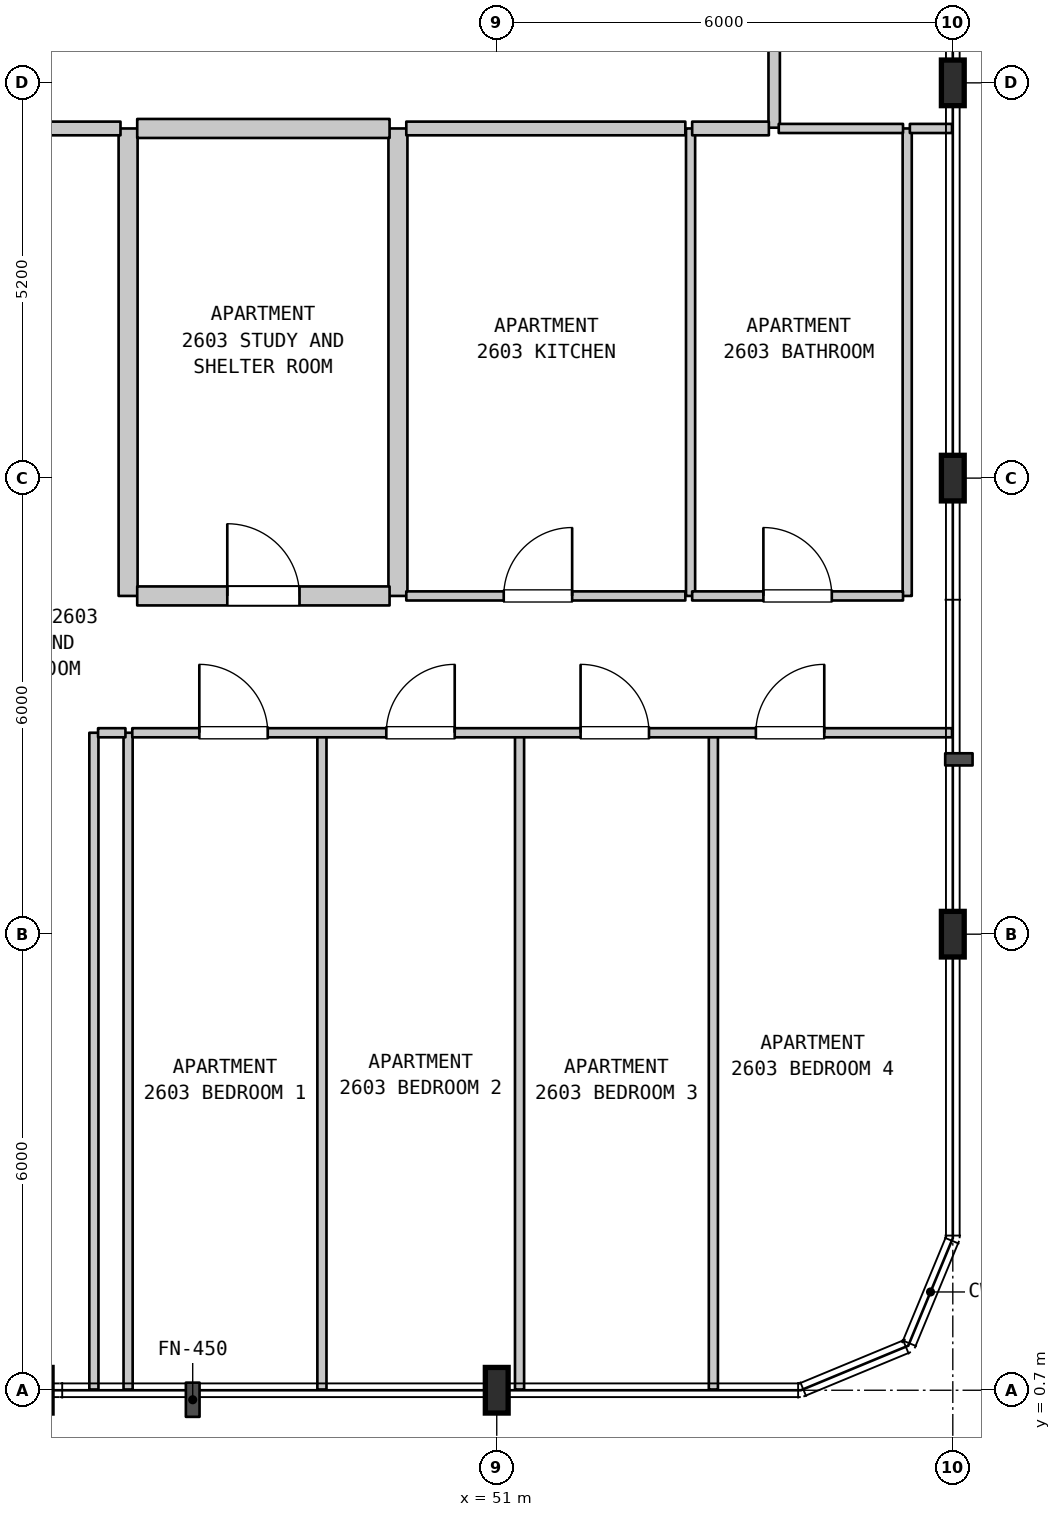
"""IFC4 building model, lengths in metres.
Left out: names, types, materials, properties, quantities, classifications, styles, units other than length and angle.
Written with IfcOpenShell. Run it as: python <this file> out.ifc"""

import sys

from ifc_helpers import new_model, si_unit, direction, frame, frame_2d, origin, origin_2d, place, context, subcontext, project, spatial, rectangle, i_section, extrude, element, fill, save


model = new_model("IFC4")
c1 = context("Model", 3, precision=1e-05, world=origin(), true_north=direction((0.0, 1.0)))
c2 = subcontext(c1, "Body", "Model", "MODEL_VIEW")
j1 = project(units=[si_unit("LENGTHUNIT", "METRE"), si_unit("PLANEANGLEUNIT", "RADIAN")], contexts=[c1])
p1 = place(None, origin())
s1 = spatial("IfcSite", under=j1, at=p1, CompositionType="ELEMENT")
p2 = place(p1, origin())
s2 = spatial("IfcBuilding", under=s1, at=p2, CompositionType="ELEMENT")
p3 = place(p2, frame((0.0, 0.0, 109.4)))
s3 = spatial("IfcBuildingStorey", under=s2, at=p3, CompositionType="ELEMENT", Elevation=109.4)
for number, where, z_axis, x_axis in (
    (1, (51.0, 0.7, 0.0), (0.0, 0.0, 1.0), (1.0, 0.0, 0.0)),
    (2, (57.0, 6.7, 0.0), (0.0, 0.0, 1.0), (1.0, 0.0, 0.0)),
    (3, (57.0, 12.7, 0.0), (0.0, 0.0, 1.0), (1.0, 0.0, 0.0)),
    (4, (57.0, 17.9, 0.0), (0.0, 0.0, 1.0), (1.0, 0.0, 0.0)),
):
    element("IfcColumn", number, at=place(p3, frame(where, z_axis=z_axis, x_axis=x_axis)), inside=s3, PredefinedType="COLUMN", context=c2, shape_type="SweptSolid", body=[
        extrude(i_section(OverallWidth=0.3, OverallDepth=0.6, WebThickness=0.015, FlangeThickness=0.03, FilletRadius=0.027, at=origin_2d()), origin(), (0.0, 0.0, 1.0), 3.7),
    ])
for number, where, z_axis, x_axis in (
    (5, (45.7, 0.71, 0.0), (0.0, 0.0, 1.0), (0.0, 1.0, 0.0)),
    (6, (46.15, 0.71, 0.0), (0.0, 0.0, 1.0), (0.0, 1.0, 0.0)),
):
    element("IfcWall", number, at=place(p3, frame(where, z_axis=z_axis, x_axis=x_axis)), inside=s3, PredefinedType="PARTITIONING", context=c2, shape_type="SweptSolid", body=[
        extrude(rectangle(XDim=8.64, YDim=0.12, at=frame_2d((4.32, 0.0))), origin(), (0.0, 0.0, 1.0), 3.385),
    ])
p4 = place(p3, frame((46.15, 11.15, 0.0), z_axis=(0.0, 0.0, 1.0), x_axis=(0.0, 1.0, 0.0)))
e7 = element("IfcWall", 7, at=p4, inside=s3, PredefinedType="STANDARD", context=c2, shape_type="SweptSolid", body=[
    extrude(rectangle(XDim=6.15, YDim=0.25, at=frame_2d((3.075, 0.0))), origin(), (0.0, 0.0, 1.0), 3.385),
])
p5 = place(p3, frame((48.7, 0.71, 0.0), z_axis=(0.0, 0.0, 1.0), x_axis=(0.0, 1.0, 0.0)))
e8 = element("IfcWall", 8, at=p5, inside=s3, PredefinedType="PARTITIONING", context=c2, shape_type="SweptSolid", body=[
    extrude(rectangle(XDim=8.64, YDim=0.12, at=frame_2d((4.32, 0.0))), origin(), (0.0, 0.0, 1.0), 3.385),
])
p6 = place(p3, frame((49.7, 11.15, 0.0), z_axis=(0.0, 0.0, 1.0), x_axis=(0.0, 1.0, 0.0)))
e9 = element("IfcWall", 9, at=p6, inside=s3, PredefinedType="STANDARD", context=c2, shape_type="SweptSolid", body=[
    extrude(rectangle(XDim=6.15, YDim=0.25, at=frame_2d((3.075, 0.0))), origin(), (0.0, 0.0, 1.0), 3.385),
])
p7 = place(p3, frame((51.3, 0.71, 0.0), z_axis=(0.0, 0.0, 1.0), x_axis=(0.0, 1.0, 0.0)))
e10 = element("IfcWall", 10, at=p7, inside=s3, PredefinedType="PARTITIONING", context=c2, shape_type="SweptSolid", body=[
    extrude(rectangle(XDim=8.64, YDim=0.12, at=frame_2d((4.32, 0.0))), origin(), (0.0, 0.0, 1.0), 3.385),
])
p8 = place(p3, frame((53.55, 11.15, 0.0), z_axis=(0.0, 0.0, 1.0), x_axis=(0.0, 1.0, 0.0)))
e11 = element("IfcWall", 11, at=p8, inside=s3, PredefinedType="PARTITIONING", context=c2, shape_type="SweptSolid", body=[
    extrude(rectangle(XDim=6.15, YDim=0.12, at=frame_2d((3.075, 0.0))), origin(), (0.0, 0.0, 1.0), 3.385),
])
p9 = place(p3, frame((53.85, 0.71, 0.0), z_axis=(0.0, 0.0, 1.0), x_axis=(0.0, 1.0, 0.0)))
e12 = element("IfcWall", 12, at=p9, inside=s3, PredefinedType="PARTITIONING", context=c2, shape_type="SweptSolid", body=[
    extrude(rectangle(XDim=8.64, YDim=0.12, at=frame_2d((4.32, 0.0))), origin(), (0.0, 0.0, 1.0), 3.385),
])
p10 = place(p3, frame((54.65, 17.31, 0.0), z_axis=(0.0, 0.0, 1.0), x_axis=(0.0, 1.0, 0.0)))
e13 = element("IfcWall", 13, at=p10, inside=s3, PredefinedType="STANDARD", context=c2, shape_type="SweptSolid", body=[
    extrude(rectangle(XDim=2.19, YDim=0.15, at=frame_2d((1.095, 0.0))), origin(), (0.0, 0.0, 1.0), 3.385),
])
p11 = place(p3, frame((56.4, 11.15, 0.0), z_axis=(0.0, 0.0, 1.0), x_axis=(0.0, 1.0, 0.0)))
e14 = element("IfcWall", 14, at=p11, inside=s3, PredefinedType="PARTITIONING", context=c2, shape_type="SweptSolid", body=[
    extrude(rectangle(XDim=6.15, YDim=0.12, at=frame_2d((3.075, 0.0))), origin(), (0.0, 0.0, 1.0), 3.385),
])
p12 = place(p3, frame((45.755, 9.35, 0.0), z_axis=(0.0, 0.0, 1.0), x_axis=(1.0, 0.0, 0.0)))
e15 = element("IfcWall", 15, at=p12, inside=s3, PredefinedType="PARTITIONING", context=c2, shape_type="SweptSolid", body=[
    extrude(rectangle(XDim=0.36, YDim=0.12, at=frame_2d((0.18, 0.0))), origin(), (0.0, 0.0, 1.0), 3.385),
])
p13 = place(p3, frame((46.205, 9.35, 0.0), z_axis=(0.0, 0.0, 1.0), x_axis=(1.0, 0.0, 0.0)))
e16 = element("IfcWall", 16, at=p13, inside=s3, PredefinedType="PARTITIONING", context=c2, shape_type="SweptSolid", body=[
    extrude(rectangle(XDim=10.785, YDim=0.12, at=frame_2d((5.393, 0.0))), origin(), (0.0, 0.0, 1.0), 3.385),
])
p14 = place(p13, frame((0.882, 0.0, 0.0)))
e17 = element("IfcOpeningElement", 17, at=p14, cuts=e16, PredefinedType="OPENING", context=c2, shape_type="SweptSolid", body=[
    extrude(rectangle(XDim=0.9, YDim=2.15, at=frame_2d((0.45, 1.075))), frame((0.0, 0.07, 0.0), z_axis=(0.0, -1.0, 0.0), x_axis=(1.0, 0.0, 0.0)), (0.0, 0.0, 1.0), 0.14),
])
p15 = place(p13, frame((3.342, 0.0, 0.0)))
e18 = element("IfcOpeningElement", 18, at=p15, cuts=e16, PredefinedType="OPENING", context=c2, shape_type="SweptSolid", body=[
    extrude(rectangle(XDim=0.9, YDim=2.15, at=frame_2d((0.45, 1.075))), frame((0.0, 0.07, 0.0), z_axis=(0.0, -1.0, 0.0), x_axis=(1.0, 0.0, 0.0)), (0.0, 0.0, 1.0), 0.14),
])
p16 = place(p13, frame((5.898, 0.0, 0.0)))
e19 = element("IfcOpeningElement", 19, at=p16, cuts=e16, PredefinedType="OPENING", context=c2, shape_type="SweptSolid", body=[
    extrude(rectangle(XDim=0.9, YDim=2.15, at=frame_2d((0.45, 1.075))), frame((0.0, 0.07, 0.0), z_axis=(0.0, -1.0, 0.0), x_axis=(1.0, 0.0, 0.0)), (0.0, 0.0, 1.0), 0.14),
])
p17 = place(p13, frame((8.204, 0.0, 0.0)))
e20 = element("IfcOpeningElement", 20, at=p17, cuts=e16, PredefinedType="OPENING", context=c2, shape_type="SweptSolid", body=[
    extrude(rectangle(XDim=0.9, YDim=2.15, at=frame_2d((0.45, 1.075))), frame((0.0, 0.07, 0.0), z_axis=(0.0, -1.0, 0.0), x_axis=(1.0, 0.0, 0.0)), (0.0, 0.0, 1.0), 0.14),
])
p18 = place(p3, frame((46.27, 11.15, 0.0), z_axis=(0.0, 0.0, 1.0), x_axis=(1.0, 0.0, 0.0)))
e21 = element("IfcWall", 21, at=p18, inside=s3, PredefinedType="STANDARD", context=c2, shape_type="SweptSolid", body=[
    extrude(rectangle(XDim=3.32, YDim=0.25, at=frame_2d((1.66, 0.0))), origin(), (0.0, 0.0, 1.0), 3.385),
])
p19 = place(p18, frame((1.185, 0.0, 0.0)))
e22 = element("IfcOpeningElement", 22, at=p19, cuts=e21, PredefinedType="OPENING", context=c2, shape_type="SweptSolid", body=[
    extrude(rectangle(XDim=0.95, YDim=2.15, at=frame_2d((0.475, 1.075))), frame((0.0, 0.135, 0.0), z_axis=(0.0, -1.0, 0.0), x_axis=(1.0, 0.0, 0.0)), (0.0, 0.0, 1.0), 0.27),
])
p20 = place(p3, frame((49.81, 11.15, 0.0), z_axis=(0.0, 0.0, 1.0), x_axis=(1.0, 0.0, 0.0)))
e23 = element("IfcWall", 23, at=p20, inside=s3, PredefinedType="PARTITIONING", context=c2, shape_type="SweptSolid", body=[
    extrude(rectangle(XDim=3.671, YDim=0.12, at=frame_2d((1.835, 0.0))), origin(), (0.0, 0.0, 1.0), 3.385),
])
p21 = place(p20, frame((1.282, 0.0, 0.0)))
e24 = element("IfcOpeningElement", 24, at=p21, cuts=e23, PredefinedType="OPENING", context=c2, shape_type="SweptSolid", body=[
    extrude(rectangle(XDim=0.9, YDim=2.15, at=frame_2d((0.45, 1.075))), frame((0.0, 0.07, 0.0), z_axis=(0.0, -1.0, 0.0), x_axis=(1.0, 0.0, 0.0)), (0.0, 0.0, 1.0), 0.14),
])
p22 = place(p3, frame((53.571, 11.15, 0.0), z_axis=(0.0, 0.0, 1.0), x_axis=(1.0, 0.0, 0.0)))
e25 = element("IfcWall", 25, at=p22, inside=s3, PredefinedType="PARTITIONING", context=c2, shape_type="SweptSolid", body=[
    extrude(rectangle(XDim=2.774, YDim=0.12, at=frame_2d((1.387, 0.0))), origin(), (0.0, 0.0, 1.0), 3.385),
])
p23 = place(p22, frame((0.937, 0.0, 0.0)))
e26 = element("IfcOpeningElement", 26, at=p23, cuts=e25, PredefinedType="OPENING", context=c2, shape_type="SweptSolid", body=[
    extrude(rectangle(XDim=0.9, YDim=2.1, at=frame_2d((0.45, 1.05))), frame((0.0, 0.07, 0.0), z_axis=(0.0, -1.0, 0.0), x_axis=(1.0, 0.0, 0.0)), (0.0, 0.0, 1.0), 0.14),
])
p24 = place(p3, frame((40.505, 17.3, 0.0), z_axis=(0.0, 0.0, 1.0), x_axis=(1.0, 0.0, 0.0)))
e27 = element("IfcWall", 27, at=p24, inside=s3, PredefinedType="STANDARD", context=c2, shape_type="SweptSolid", body=[
    extrude(rectangle(XDim=5.545, YDim=0.18, at=frame_2d((2.772, 0.0))), origin(), (0.0, 0.0, 1.0), 3.385),
])
p25 = place(p24, frame((2.435, 0.0, 0.0)))
e28 = element("IfcOpeningElement", 28, at=p25, cuts=e27, PredefinedType="OPENING", context=c2, shape_type="SweptSolid", body=[
    extrude(rectangle(XDim=1.0, YDim=2.15, at=frame_2d((0.5, 1.075))), frame((0.0, 0.1, 0.0), z_axis=(0.0, -1.0, 0.0), x_axis=(1.0, 0.0, 0.0)), (0.0, 0.0, 1.0), 0.2),
])
p26 = place(p3, frame((46.27, 17.3, 0.0), z_axis=(0.0, 0.0, 1.0), x_axis=(1.0, 0.0, 0.0)))
e29 = element("IfcWall", 29, at=p26, inside=s3, PredefinedType="STANDARD", context=c2, shape_type="SweptSolid", body=[
    extrude(rectangle(XDim=3.32, YDim=0.25, at=frame_2d((1.66, 0.0))), origin(), (0.0, 0.0, 1.0), 3.385),
])
p27 = place(p3, frame((49.81, 17.3, 0.0), z_axis=(0.0, 0.0, 1.0), x_axis=(1.0, 0.0, 0.0)))
e30 = element("IfcWall", 30, at=p27, inside=s3, PredefinedType="STANDARD", context=c2, shape_type="SweptSolid", body=[
    extrude(rectangle(XDim=3.671, YDim=0.18, at=frame_2d((1.835, 0.0))), origin(), (0.0, 0.0, 1.0), 3.385),
])
p28 = place(p3, frame((53.571, 17.3, 0.0), z_axis=(0.0, 0.0, 1.0), x_axis=(1.0, 0.0, 0.0)))
e31 = element("IfcWall", 31, at=p28, inside=s3, PredefinedType="STANDARD", context=c2, shape_type="SweptSolid", body=[
    extrude(rectangle(XDim=1.009, YDim=0.18, at=frame_2d((0.504, 0.0))), origin(), (0.0, 0.0, 1.0), 3.385),
])
p29 = place(p3, frame((54.71, 17.3, 0.0), z_axis=(0.0, 0.0, 1.0), x_axis=(1.0, 0.0, 0.0)))
e32 = element("IfcWall", 32, at=p29, inside=s3, PredefinedType="PARTITIONING", context=c2, shape_type="SweptSolid", body=[
    extrude(rectangle(XDim=1.635, YDim=0.12, at=frame_2d((0.817, 0.0))), origin(), (0.0, 0.0, 1.0), 3.385),
])
p30 = place(p3, frame((56.435, 17.3, 0.0), z_axis=(0.0, 0.0, 1.0), x_axis=(1.0, 0.0, 0.0)))
e33 = element("IfcWall", 33, at=p30, inside=s3, PredefinedType="PARTITIONING", context=c2, shape_type="SweptSolid", body=[
    extrude(rectangle(XDim=0.555, YDim=0.12, at=frame_2d((0.277, 0.0))), origin(), (0.0, 0.0, 1.0), 3.385),
])
p31 = place(p14, origin())
e34 = element("IfcDoor", 34, at=p31, inside=s3, OperationType="SINGLE_SWING_LEFT", PredefinedType="DOOR", context=c2, shape_type="SweptSolid", body=[
    extrude(rectangle(XDim=0.9, YDim=2.15, at=frame_2d((0.45, 1.075))), frame((0.0, 0.025, 0.0), z_axis=(0.0, -1.0, 0.0), x_axis=(1.0, 0.0, 0.0)), (0.0, 0.0, 1.0), 0.05),
])
fill(e17, e34)
p32 = place(p15, origin())
e35 = element("IfcDoor", 35, at=p32, inside=s3, OperationType="SINGLE_SWING_RIGHT", PredefinedType="DOOR", context=c2, shape_type="SweptSolid", body=[
    extrude(rectangle(XDim=0.9, YDim=2.15, at=frame_2d((0.45, 1.075))), frame((0.0, 0.025, 0.0), z_axis=(0.0, -1.0, 0.0), x_axis=(1.0, 0.0, 0.0)), (0.0, 0.0, 1.0), 0.05),
])
fill(e18, e35)
p33 = place(p16, origin())
e36 = element("IfcDoor", 36, at=p33, inside=s3, OperationType="SINGLE_SWING_LEFT", PredefinedType="DOOR", context=c2, shape_type="SweptSolid", body=[
    extrude(rectangle(XDim=0.9, YDim=2.15, at=frame_2d((0.45, 1.075))), frame((0.0, 0.025, 0.0), z_axis=(0.0, -1.0, 0.0), x_axis=(1.0, 0.0, 0.0)), (0.0, 0.0, 1.0), 0.05),
])
fill(e19, e36)
p34 = place(p17, origin())
e37 = element("IfcDoor", 37, at=p34, inside=s3, OperationType="SINGLE_SWING_RIGHT", PredefinedType="DOOR", context=c2, shape_type="SweptSolid", body=[
    extrude(rectangle(XDim=0.9, YDim=2.15, at=frame_2d((0.45, 1.075))), frame((0.0, 0.025, 0.0), z_axis=(0.0, -1.0, 0.0), x_axis=(1.0, 0.0, 0.0)), (0.0, 0.0, 1.0), 0.05),
])
fill(e20, e37)
p35 = place(p19, origin())
e38 = element("IfcDoor", 38, at=p35, inside=s3, OperationType="SINGLE_SWING_LEFT", PredefinedType="DOOR", context=c2, shape_type="SweptSolid", body=[
    extrude(rectangle(XDim=0.95, YDim=2.15, at=frame_2d((0.475, 1.075))), frame((0.0, 0.025, 0.0), z_axis=(0.0, -1.0, 0.0), x_axis=(1.0, 0.0, 0.0)), (0.0, 0.0, 1.0), 0.05),
])
fill(e22, e38)
p36 = place(p21, origin())
e39 = element("IfcDoor", 39, at=p36, inside=s3, OperationType="SINGLE_SWING_RIGHT", PredefinedType="DOOR", context=c2, shape_type="SweptSolid", body=[
    extrude(rectangle(XDim=0.9, YDim=2.15, at=frame_2d((0.45, 1.075))), frame((0.0, 0.025, 0.0), z_axis=(0.0, -1.0, 0.0), x_axis=(1.0, 0.0, 0.0)), (0.0, 0.0, 1.0), 0.05),
])
fill(e24, e39)
p37 = place(p23, origin())
e40 = element("IfcDoor", 40, at=p37, inside=s3, OperationType="SINGLE_SWING_LEFT", PredefinedType="DOOR", context=c2, shape_type="SweptSolid", body=[
    extrude(rectangle(XDim=0.9, YDim=2.1, at=frame_2d((0.45, 1.05))), frame((0.0, 0.025, 0.0), z_axis=(0.0, -1.0, 0.0), x_axis=(1.0, 0.0, 0.0)), (0.0, 0.0, 1.0), 0.05),
])
fill(e26, e40)
save(model, sys.argv[1])
